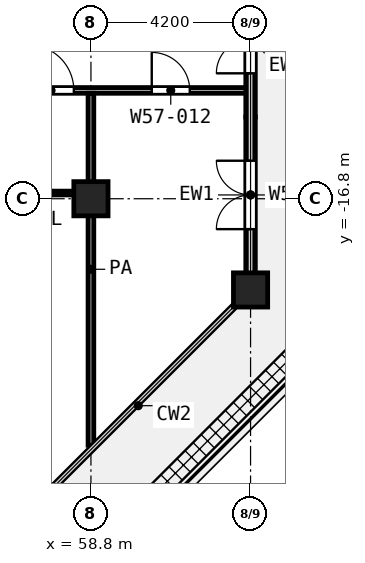
"""IFC4 building model, lengths in metres.
Left out: names, types, materials, properties, quantities, classifications, styles, units other than length and angle.
Written with IfcOpenShell. Run it as: python <this file> out.ifc"""

import sys

from ifc_helpers import new_model, si_unit, direction, frame, frame_2d, origin, origin_2d, place, context, subcontext, project, spatial, rectangle, extrude, element, fill, save


model = new_model("IFC4")
c1 = context("Model", 3, precision=1e-05, world=origin(), true_north=direction((0.0, 1.0)))
c2 = subcontext(c1, "Body", "Model", "MODEL_VIEW")
j1 = project(units=[si_unit("LENGTHUNIT", "METRE"), si_unit("PLANEANGLEUNIT", "RADIAN")], contexts=[c1])
p1 = place(None, origin())
s1 = spatial("IfcSite", under=j1, at=p1, CompositionType="ELEMENT")
p2 = place(p1, origin())
s2 = spatial("IfcBuilding", under=s1, at=p2, CompositionType="ELEMENT")
p3 = place(p2, frame((0.0, 0.0, 268.4)))
s3 = spatial("IfcBuildingStorey", under=s2, at=p3, CompositionType="ELEMENT", Elevation=268.4)
for number, where, z_axis, x_axis in (
    (1, (58.8, -16.8, 0.0), (0.0, 0.0, 1.0), (1.0, 0.0, 0.0)),
    (2, (63.0, -19.2, 0.0), (0.0, 0.0, 1.0), (1.0, 0.0, 0.0)),
):
    element("IfcColumn", number, at=place(p3, frame(where, z_axis=z_axis, x_axis=x_axis)), inside=s3, PredefinedType="COLUMN", context=c2, shape_type="SweptSolid", body=[
        extrude(rectangle(XDim=0.9, YDim=0.9, at=origin_2d()), origin(), (0.0, 0.0, 1.0), 4.2),
    ])
p4 = place(p3, frame((63.0, -18.75, 0.0), z_axis=(0.0, 0.0, 1.0), x_axis=(0.0, 1.0, 0.0)))
e3 = element("IfcWall", 3, at=p4, inside=s3, PredefinedType="SOLIDWALL", context=c2, shape_type="SweptSolid", body=[
    extrude(rectangle(XDim=4.1, YDim=0.25, at=frame_2d((2.05, 0.0))), origin(), (0.0, 0.0, 1.0), 3.58),
])
p5 = place(p4, frame((1.15, 0.0, 0.0)))
e4 = element("IfcOpeningElement", 4, at=p5, cuts=e3, PredefinedType="OPENING", context=c2, shape_type="SweptSolid", body=[
    extrude(rectangle(XDim=1.8, YDim=2.1, at=frame_2d((0.9, 1.05))), frame((0.0, 0.135, 0.0), z_axis=(0.0, -1.0, 0.0), x_axis=(1.0, 0.0, 0.0)), (0.0, 0.0, 1.0), 0.27),
])
p6 = place(p3, frame((63.0, -14.65, 0.0), z_axis=(0.0, 0.0, 1.0), x_axis=(0.0, 1.0, 0.0)))
e5 = element("IfcWall", 5, at=p6, inside=s3, PredefinedType="SOLIDWALL", context=c2, shape_type="SweptSolid", body=[
    extrude(rectangle(XDim=4.1, YDim=0.25, at=frame_2d((2.05, 0.0))), origin(), (0.0, 0.0, 1.0), 3.58),
])
p7 = place(p6, frame((1.15, 0.0, 0.0)))
e6 = element("IfcOpeningElement", 6, at=p7, cuts=e5, PredefinedType="OPENING", context=c2, shape_type="SweptSolid", body=[
    extrude(rectangle(XDim=1.8, YDim=2.1, at=frame_2d((0.9, 1.05))), frame((0.0, 0.135, 0.0), z_axis=(0.0, -1.0, 0.0), x_axis=(1.0, 0.0, 0.0)), (0.0, 0.0, 1.0), 0.27),
])
p8 = place(p3, frame((56.75, -16.65, 0.0), z_axis=(0.0, 0.0, 1.0), x_axis=(1.0, 0.0, 0.0)))
e7 = element("IfcWall", 7, at=p8, inside=s3, PredefinedType="PARTITIONING", context=c2, shape_type="SweptSolid", body=[
    extrude(rectangle(XDim=1.975, YDim=0.1, at=frame_2d((0.988, 0.0))), origin(), (0.0, 0.0, 1.0), 3.7),
])
p9 = place(p3, frame((29.4, -13.95, 0.0), z_axis=(0.0, 0.0, 1.0), x_axis=(1.0, 0.0, 0.0)))
e8 = element("IfcWall", 8, at=p9, inside=s3, PredefinedType="PARTITIONING", context=c2, shape_type="SweptSolid", body=[
    extrude(rectangle(XDim=33.52, YDim=0.15, at=frame_2d((16.76, 0.0))), origin(), (0.0, 0.0, 1.0), 3.7),
])
p10 = place(p9, frame((1.5, 0.0, 0.0)))
e9 = element("IfcOpeningElement", 9, at=p10, cuts=e8, PredefinedType="OPENING", context=c2, shape_type="SweptSolid", body=[
    extrude(rectangle(XDim=1.2, YDim=2.1, at=frame_2d((0.6, 1.05))), frame((0.0, 0.085, 0.0), z_axis=(0.0, -1.0, 0.0), x_axis=(1.0, 0.0, 0.0)), (0.0, 0.0, 1.0), 0.17),
])
p11 = place(p9, frame((8.85, 0.0, 0.0)))
e10 = element("IfcOpeningElement", 10, at=p11, cuts=e8, PredefinedType="OPENING", context=c2, shape_type="SweptSolid", body=[
    extrude(rectangle(XDim=1.2, YDim=2.1, at=frame_2d((0.6, 1.05))), frame((0.0, 0.085, 0.0), z_axis=(0.0, -1.0, 0.0), x_axis=(1.0, 0.0, 0.0)), (0.0, 0.0, 1.0), 0.17),
])
p12 = place(p9, frame((7.3, 0.0, 0.0)))
e11 = element("IfcOpeningElement", 11, at=p12, cuts=e8, PredefinedType="OPENING", context=c2, shape_type="SweptSolid", body=[
    extrude(rectangle(XDim=1.2, YDim=2.1, at=frame_2d((0.6, 1.05))), frame((0.0, 0.085, 0.0), z_axis=(0.0, -1.0, 0.0), x_axis=(1.0, 0.0, 0.0)), (0.0, 0.0, 1.0), 0.17),
])
p13 = place(p9, frame((10.95, 0.0, 0.0)))
e12 = element("IfcOpeningElement", 12, at=p13, cuts=e8, PredefinedType="OPENING", context=c2, shape_type="SweptSolid", body=[
    extrude(rectangle(XDim=1.2, YDim=2.1, at=frame_2d((0.6, 1.05))), frame((0.0, 0.085, 0.0), z_axis=(0.0, -1.0, 0.0), x_axis=(1.0, 0.0, 0.0)), (0.0, 0.0, 1.0), 0.17),
])
p14 = place(p9, frame((13.8, 0.0, 0.0)))
e13 = element("IfcOpeningElement", 13, at=p14, cuts=e8, PredefinedType="OPENING", context=c2, shape_type="SweptSolid", body=[
    extrude(rectangle(XDim=1.2, YDim=2.1, at=frame_2d((0.6, 1.05))), frame((0.0, 0.085, 0.0), z_axis=(0.0, -1.0, 0.0), x_axis=(1.0, 0.0, 0.0)), (0.0, 0.0, 1.0), 0.17),
])
p15 = place(p9, frame((19.7, 0.0, 0.0)))
e14 = element("IfcOpeningElement", 14, at=p15, cuts=e8, PredefinedType="OPENING", context=c2, shape_type="SweptSolid", body=[
    extrude(rectangle(XDim=1.1, YDim=2.1, at=frame_2d((0.55, 1.05))), frame((0.0, 0.085, 0.0), z_axis=(0.0, -1.0, 0.0), x_axis=(1.0, 0.0, 0.0)), (0.0, 0.0, 1.0), 0.17),
])
p16 = place(p9, frame((25.65, 0.0, 0.0)))
e15 = element("IfcOpeningElement", 15, at=p16, cuts=e8, PredefinedType="OPENING", context=c2, shape_type="SweptSolid", body=[
    extrude(rectangle(XDim=1.2, YDim=2.1, at=frame_2d((0.6, 1.05))), frame((0.0, 0.085, 0.0), z_axis=(0.0, -1.0, 0.0), x_axis=(1.0, 0.0, 0.0)), (0.0, 0.0, 1.0), 0.17),
])
p17 = place(p9, frame((24.1, 0.0, 0.0)))
e16 = element("IfcOpeningElement", 16, at=p17, cuts=e8, PredefinedType="OPENING", context=c2, shape_type="SweptSolid", body=[
    extrude(rectangle(XDim=1.2, YDim=2.1, at=frame_2d((0.6, 1.05))), frame((0.0, 0.085, 0.0), z_axis=(0.0, -1.0, 0.0), x_axis=(1.0, 0.0, 0.0)), (0.0, 0.0, 1.0), 0.17),
])
p18 = place(p9, frame((27.75, 0.0, 0.0)))
e17 = element("IfcOpeningElement", 17, at=p18, cuts=e8, PredefinedType="OPENING", context=c2, shape_type="SweptSolid", body=[
    extrude(rectangle(XDim=1.2, YDim=2.1, at=frame_2d((0.6, 1.05))), frame((0.0, 0.085, 0.0), z_axis=(0.0, -1.0, 0.0), x_axis=(1.0, 0.0, 0.0)), (0.0, 0.0, 1.0), 0.17),
])
p19 = place(p9, frame((31.0, 0.0, 0.0)))
e18 = element("IfcOpeningElement", 18, at=p19, cuts=e8, PredefinedType="OPENING", context=c2, shape_type="SweptSolid", body=[
    extrude(rectangle(XDim=1.0, YDim=2.1, at=frame_2d((0.5, 1.05))), frame((0.0, 0.085, 0.0), z_axis=(0.0, -1.0, 0.0), x_axis=(1.0, 0.0, 0.0)), (0.0, 0.0, 1.0), 0.17),
])
p20 = place(p3, frame((58.8, -23.287, 0.0), z_axis=(0.0, 0.0, 1.0), x_axis=(0.0, 1.0, 0.0)))
e19 = element("IfcWall", 19, at=p20, inside=s3, PredefinedType="PARTITIONING", context=c2, shape_type="SweptSolid", body=[
    extrude(rectangle(XDim=9.262, YDim=0.15, at=frame_2d((4.631, 0.0))), origin(), (0.0, 0.0, 1.0), 3.7),
])
p21 = place(p5, origin())
e20 = element("IfcDoor", 20, at=p21, inside=s3, OperationType="DOUBLE_DOOR_SINGLE_SWING", PredefinedType="DOOR", context=c2, shape_type="SweptSolid", body=[
    extrude(rectangle(XDim=1.8, YDim=2.1, at=frame_2d((0.9, 1.05))), frame((0.0, 0.025, 0.0), z_axis=(0.0, -1.0, 0.0), x_axis=(1.0, 0.0, 0.0)), (0.0, 0.0, 1.0), 0.05),
])
fill(e4, e20)
p22 = place(p7, origin())
e21 = element("IfcDoor", 21, at=p22, inside=s3, OperationType="DOUBLE_DOOR_SINGLE_SWING", PredefinedType="DOOR", context=c2, shape_type="SweptSolid", body=[
    extrude(rectangle(XDim=1.8, YDim=2.1, at=frame_2d((0.9, 1.05))), frame((0.0, 0.025, 0.0), z_axis=(0.0, -1.0, 0.0), x_axis=(1.0, 0.0, 0.0)), (0.0, 0.0, 1.0), 0.05),
])
fill(e6, e21)
p23 = place(p18, origin())
e22 = element("IfcDoor", 22, at=p23, inside=s3, OperationType="SINGLE_SWING_LEFT", PredefinedType="DOOR", context=c2, shape_type="SweptSolid", body=[
    extrude(rectangle(XDim=1.2, YDim=2.1, at=frame_2d((0.6, 1.05))), frame((0.0, 0.025, 0.0), z_axis=(0.0, -1.0, 0.0), x_axis=(1.0, 0.0, 0.0)), (0.0, 0.0, 1.0), 0.05),
])
fill(e17, e22)
p24 = place(p19, origin())
e23 = element("IfcDoor", 23, at=p24, inside=s3, OperationType="SINGLE_SWING_LEFT", PredefinedType="DOOR", context=c2, shape_type="SweptSolid", body=[
    extrude(rectangle(XDim=1.0, YDim=2.1, at=frame_2d((0.5, 1.05))), frame((0.0, 0.025, 0.0), z_axis=(0.0, -1.0, 0.0), x_axis=(1.0, 0.0, 0.0)), (0.0, 0.0, 1.0), 0.05),
])
fill(e18, e23)
save(model, sys.argv[1])
